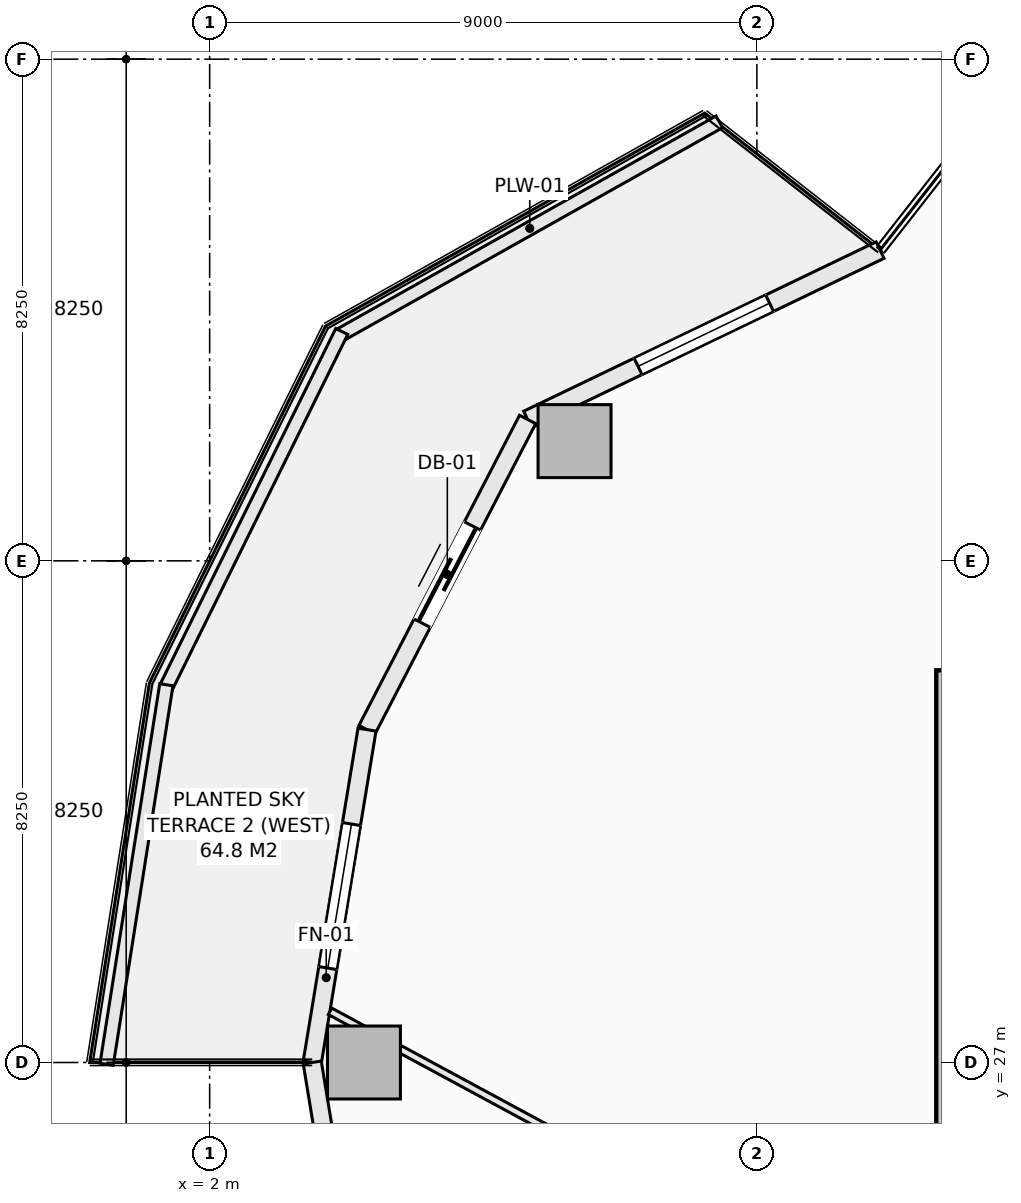
"""IFC4 building model, lengths in metres.
Left out: names, types, materials, properties, quantities, classifications, styles, units other than length and angle.
Written with IfcOpenShell. Run it as: python <this file> out.ifc"""

import sys

from ifc_helpers import new_model, si_unit, direction, frame, frame_2d, origin, origin_2d, place, context, subcontext, project, spatial, rectangle, extrude, element, fill, save


model = new_model("IFC4")
c1 = context("Model", 3, precision=1e-05, world=origin(), true_north=direction((0.0, 1.0)))
c2 = subcontext(c1, "Body", "Model", "MODEL_VIEW")
j1 = project(units=[si_unit("LENGTHUNIT", "METRE"), si_unit("PLANEANGLEUNIT", "RADIAN")], contexts=[c1])
p1 = place(None, origin())
s1 = spatial("IfcSite", under=j1, at=p1, CompositionType="ELEMENT")
p2 = place(p1, origin())
s2 = spatial("IfcBuilding", under=s1, at=p2, CompositionType="ELEMENT")
p3 = place(p2, frame((0.0, 0.0, 91.95)))
s3 = spatial("IfcBuildingStorey", under=s2, at=p3, CompositionType="ELEMENT", Elevation=91.95)
p4 = place(p3, frame((14.375, 20.55, -0.28), z_axis=(0.0, 0.0, 1.0), x_axis=(0.0, 1.0, 0.0)))
e1 = element("IfcWall", 1, at=p4, inside=s3, PredefinedType="SHEAR", context=c2, shape_type="SweptSolid", body=[
    extrude(rectangle(XDim=12.9, YDim=0.85, at=frame_2d((6.45, 0.0))), origin(), (0.0, 0.0, 1.0), 3.81),
])
for number, where, z_axis, x_axis in (
    (2, (8.001, 37.219, -0.28), (0.0, 0.0, 1.0), (1.0, 0.0, 0.0)),
    (3, (4.538, 27.0, -0.28), (0.0, 0.0, 1.0), (1.0, 0.0, 0.0)),
):
    element("IfcColumn", number, at=place(p3, frame(where, z_axis=z_axis, x_axis=x_axis)), inside=s3, PredefinedType="COLUMN", context=c2, shape_type="SweptSolid", body=[
        extrude(rectangle(XDim=1.2, YDim=1.2, at=origin_2d()), origin(), (0.0, 0.0, 1.0), 3.81),
    ])
p5 = place(p3, frame((7.229, 37.575, 0.0), z_axis=(0.0, 0.0, 1.0), x_axis=(0.901354747727, 0.433081538224, 0.0)))
e4 = element("IfcWall", 4, at=p5, inside=s3, PredefinedType="SOLIDWALL", context=c2, shape_type="SweptSolid", body=[
    extrude(rectangle(XDim=6.431, YDim=0.3, at=frame_2d((3.215, 0.0))), origin(), (0.0, 0.0, 1.0), 3.053),
])
p6 = place(p5, frame((2.015, 0.0, 0.85)))
e5 = element("IfcOpeningElement", 5, at=p6, cuts=e4, PredefinedType="OPENING", context=c2, shape_type="SweptSolid", body=[
    extrude(rectangle(XDim=2.4, YDim=1.9, at=frame_2d((1.2, 0.95))), frame((0.0, 0.16, 0.0), z_axis=(0.0, -1.0, 0.0), x_axis=(1.0, 0.0, 0.0)), (0.0, 0.0, 1.0), 0.32),
])
p7 = place(p3, frame((4.588, 32.474, 0.0), z_axis=(0.0, 0.0, 1.0), x_axis=(0.459800981414, 0.888021991558, 0.0)))
e6 = element("IfcWall", 6, at=p7, inside=s3, PredefinedType="SOLIDWALL", context=c2, shape_type="SweptSolid", body=[
    extrude(rectangle(XDim=5.744, YDim=0.3, at=frame_2d((2.872, 0.0))), origin(), (0.0, 0.0, 1.0), 3.053),
])
p8 = place(p7, frame((1.972, 0.0, 0.0)))
e7 = element("IfcOpeningElement", 7, at=p8, cuts=e6, PredefinedType="OPENING", context=c2, shape_type="SweptSolid", body=[
    extrude(rectangle(XDim=1.8, YDim=2.25, at=frame_2d((0.9, 1.125))), frame((0.0, 0.16, 0.0), z_axis=(0.0, -1.0, 0.0), x_axis=(1.0, 0.0, 0.0)), (0.0, 0.0, 1.0), 0.32),
])
p9 = place(p3, frame((3.688, 27.0, 0.0), z_axis=(0.0, 0.0, 1.0), x_axis=(0.162386212206, 0.986727276447, 0.0)))
e8 = element("IfcWall", 8, at=p9, inside=s3, PredefinedType="SOLIDWALL", context=c2, shape_type="SweptSolid", body=[
    extrude(rectangle(XDim=5.548, YDim=0.3, at=frame_2d((2.774, 0.0))), origin(), (0.0, 0.0, 1.0), 3.053),
])
p10 = place(p9, frame((1.574, 0.0, 0.85)))
e9 = element("IfcOpeningElement", 9, at=p10, cuts=e8, PredefinedType="OPENING", context=c2, shape_type="SweptSolid", body=[
    extrude(rectangle(XDim=2.4, YDim=1.9, at=frame_2d((1.2, 0.95))), frame((0.0, 0.16, 0.0), z_axis=(0.0, -1.0, 0.0), x_axis=(1.0, 0.0, 0.0)), (0.0, 0.0, 1.0), 0.32),
])
p11 = place(p3, frame((3.688, 27.0, 0.0), z_axis=(0.0, 0.0, 1.0), x_axis=(0.162386212206, -0.986727276447, 0.0)))
e10 = element("IfcWall", 10, at=p11, inside=s3, PredefinedType="SOLIDWALL", context=c2, shape_type="SweptSolid", body=[
    extrude(rectangle(XDim=5.548, YDim=0.3, at=frame_2d((2.774, 0.0))), origin(), (0.0, 0.0, 1.0), 3.053),
])
p12 = place(p11, frame((1.574, 0.0, 0.85)))
e11 = element("IfcOpeningElement", 11, at=p12, cuts=e10, PredefinedType="OPENING", context=c2, shape_type="SweptSolid", body=[
    extrude(rectangle(XDim=2.4, YDim=1.9, at=frame_2d((1.2, 0.95))), frame((0.0, 0.16, 0.0), z_axis=(0.0, -1.0, 0.0), x_axis=(1.0, 0.0, 0.0)), (0.0, 0.0, 1.0), 0.32),
])
p13 = place(p3, frame((4.147, 38.966, 0.0), z_axis=(0.0, 0.0, 1.0), x_axis=(0.871775109335, 0.489906275468, 0.0)))
e12 = element("IfcWall", 12, at=p13, inside=s3, PredefinedType="PARAPET", context=c2, shape_type="SweptSolid", body=[
    extrude(rectangle(XDim=7.152, YDim=0.22, at=frame_2d((3.576, 0.0))), origin(), (0.0, 0.0, 1.0), 0.52),
])
p14 = place(p3, frame((1.275, 33.153, 0.0), z_axis=(0.0, 0.0, 1.0), x_axis=(0.442686636348, 0.89667638644, 0.0)))
e13 = element("IfcWall", 13, at=p14, inside=s3, PredefinedType="PARAPET", context=c2, shape_type="SweptSolid", body=[
    extrude(rectangle(XDim=6.545, YDim=0.22, at=frame_2d((3.272, 0.0))), origin(), (0.0, 0.0, 1.0), 0.52),
])
p15 = place(p3, frame((0.306, 26.971, 0.0), z_axis=(0.0, 0.0, 1.0), x_axis=(0.15545655238, 0.987842730561, 0.0)))
e14 = element("IfcWall", 14, at=p15, inside=s3, PredefinedType="PARAPET", context=c2, shape_type="SweptSolid", body=[
    extrude(rectangle(XDim=6.318, YDim=0.22, at=frame_2d((3.159, 0.0))), origin(), (0.0, 0.0, 1.0), 0.52),
])
p16 = place(p3, frame((3.98, 27.842, 0.0), z_axis=(0.0, 0.0, 1.0), x_axis=(0.87986629228, -0.475221324974, 0.0)))
e15 = element("IfcWall", 15, at=p16, inside=s3, PredefinedType="PARTITIONING", context=c2, shape_type="SweptSolid", body=[
    extrude(rectangle(XDim=11.329, YDim=0.12, at=frame_2d((5.665, 0.0))), origin(), (0.0, 0.0, 1.0), 2.894),
])
p17 = place(p6, origin())
e16 = element("IfcWindow", 16, at=p17, inside=s3, PartitioningType="SINGLE_PANEL", PredefinedType="WINDOW", context=c2, shape_type="SweptSolid", body=[
    extrude(rectangle(XDim=2.4, YDim=1.9, at=frame_2d((1.2, 0.95))), frame((0.0, 0.03, 0.0), z_axis=(0.0, -1.0, 0.0), x_axis=(1.0, 0.0, 0.0)), (0.0, 0.0, 1.0), 0.06),
])
fill(e5, e16)
p18 = place(p8, origin())
e17 = element("IfcDoor", 17, at=p18, inside=s3, OperationType="SLIDING_TO_LEFT", PredefinedType="DOOR", context=c2, shape_type="SweptSolid", body=[
    extrude(rectangle(XDim=1.8, YDim=2.25, at=frame_2d((0.9, 1.125))), frame((0.0, 0.025, 0.0), z_axis=(0.0, -1.0, 0.0), x_axis=(1.0, 0.0, 0.0)), (0.0, 0.0, 1.0), 0.05),
])
fill(e7, e17)
p19 = place(p10, origin())
e18 = element("IfcWindow", 18, at=p19, inside=s3, PartitioningType="SINGLE_PANEL", PredefinedType="WINDOW", context=c2, shape_type="SweptSolid", body=[
    extrude(rectangle(XDim=2.4, YDim=1.9, at=frame_2d((1.2, 0.95))), frame((0.0, 0.03, 0.0), z_axis=(0.0, -1.0, 0.0), x_axis=(1.0, 0.0, 0.0)), (0.0, 0.0, 1.0), 0.06),
])
fill(e9, e18)
save(model, sys.argv[1])
